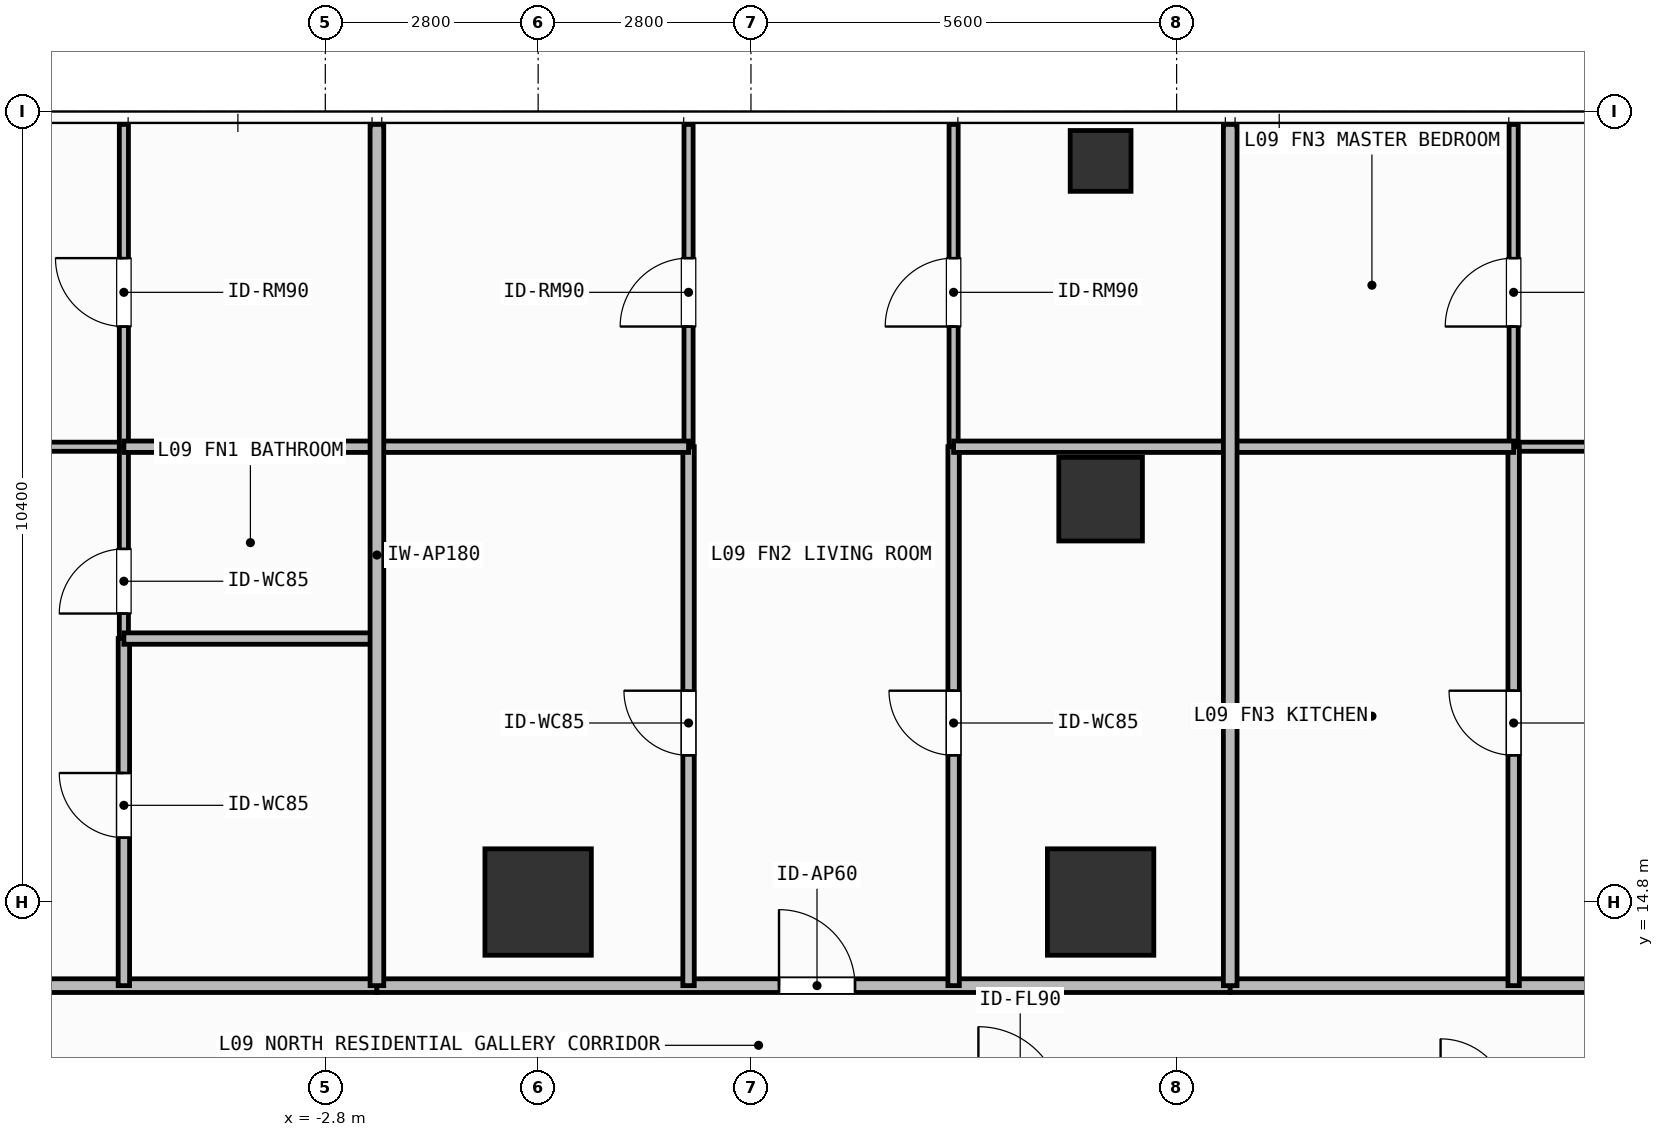
"""IFC4 building model, lengths in metres.
Left out: names, types, materials, properties, quantities, classifications, styles, units other than length and angle.
Written with IfcOpenShell. Run it as: python <this file> out.ifc"""

import sys

from ifc_helpers import new_model, si_unit, direction, frame, frame_2d, origin, origin_2d, place, context, subcontext, project, spatial, rectangle, hollow_rectangle, extrude, element, fill, save


model = new_model("IFC4")
c1 = context("Model", 3, precision=1e-05, world=origin(), true_north=direction((0.0, 1.0)))
c2 = subcontext(c1, "Body", "Model", "MODEL_VIEW")
j1 = project(units=[si_unit("LENGTHUNIT", "METRE"), si_unit("PLANEANGLEUNIT", "RADIAN")], contexts=[c1])
p1 = place(None, origin())
s1 = spatial("IfcSite", under=j1, at=p1, CompositionType="ELEMENT")
p2 = place(p1, origin())
s2 = spatial("IfcBuilding", under=s1, at=p2, CompositionType="ELEMENT")
p3 = place(p2, frame((0.0, 0.0, 34.5)))
s3 = spatial("IfcBuildingStorey", under=s2, at=p3, CompositionType="ELEMENT", Elevation=34.5)
for number, where, z_axis, x_axis in (
    (1, (0.0, 14.8, 0.0), (0.0, 0.0, 1.0), (1.0, 0.0, 0.0)),
    (2, (7.4, 14.8, 0.0), (0.0, 0.0, 1.0), (1.0, 0.0, 0.0)),
):
    element("IfcColumn", number, at=place(p3, frame(where, z_axis=z_axis, x_axis=x_axis)), inside=s3, PredefinedType="COLUMN", context=c2, shape_type="SweptSolid", body=[
        extrude(rectangle(XDim=1.4, YDim=1.4, at=origin_2d()), origin(), (0.0, 0.0, 1.0), 3.9),
    ])
p4 = place(p3, frame((7.4, 20.1, 0.0), z_axis=(0.0, 0.0, 1.0), x_axis=(1.0, 0.0, 0.0)))
e3 = element("IfcColumn", 3, at=p4, inside=s3, PredefinedType="COLUMN", context=c2, shape_type="SweptSolid", body=[
    extrude(rectangle(XDim=1.1, YDim=1.1, at=origin_2d()), origin(), (0.0, 0.0, 1.0), 3.9),
])
p5 = place(p3, frame((7.4, 24.55, 0.0), z_axis=(0.0, 0.0, 1.0), x_axis=(1.0, 0.0, 0.0)))
e4 = element("IfcColumn", 4, at=p5, inside=s3, PredefinedType="COLUMN", context=c2, shape_type="SweptSolid", body=[
    extrude(hollow_rectangle(XDim=0.8, YDim=0.8, WallThickness=0.036, at=origin_2d()), origin(), (0.0, 0.0, 1.0), 3.9),
])
p6 = place(p3, frame((-18.62, 13.7, 0.0), z_axis=(0.0, 0.0, 1.0), x_axis=(1.0, 0.0, 0.0)))
e5 = element("IfcWall", 5, at=p6, inside=s3, PredefinedType="PARTITIONING", context=c2, shape_type="SweptSolid", body=[
    extrude(rectangle(XDim=16.499, YDim=0.18, at=frame_2d((8.25, 0.0))), origin(), (0.0, 0.0, 1.0), 3.68),
])
p7 = place(p6, frame((8.91, 0.0, 0.0)))
e6 = element("IfcOpeningElement", 6, at=p7, cuts=e5, PredefinedType="OPENING", context=c2, shape_type="SweptSolid", body=[
    extrude(rectangle(XDim=1.0, YDim=2.2, at=frame_2d((0.5, 1.1))), frame((0.0, 0.1, 0.0), z_axis=(0.0, -1.0, 0.0), x_axis=(1.0, 0.0, 0.0)), (0.0, 0.0, 1.0), 0.2),
])
p8 = place(p3, frame((-12.818, 20.79, 0.0), z_axis=(0.0, 0.0, 1.0), x_axis=(1.0, 0.0, 0.0)))
e7 = element("IfcWall", 7, at=p8, inside=s3, PredefinedType="PARTITIONING", context=c2, shape_type="SweptSolid", body=[
    extrude(rectangle(XDim=7.368, YDim=0.12, at=frame_2d((3.684, 0.0))), origin(), (0.0, 0.0, 1.0), 3.68),
])
p9 = place(p8, frame((3.322, 0.0, 0.0)))
e8 = element("IfcOpeningElement", 8, at=p9, cuts=e7, PredefinedType="OPENING", context=c2, shape_type="SweptSolid", body=[
    extrude(rectangle(XDim=0.9, YDim=2.1, at=frame_2d((0.45, 1.05))), frame((0.0, 0.07, 0.0), z_axis=(0.0, -1.0, 0.0), x_axis=(1.0, 0.0, 0.0)), (0.0, 0.0, 1.0), 0.14),
])
p10 = place(p3, frame((-5.45, 13.7, 0.0), z_axis=(0.0, 0.0, 1.0), x_axis=(0.0, 1.0, 0.0)))
e9 = element("IfcWall", 9, at=p10, inside=s3, PredefinedType="PARTITIONING", context=c2, shape_type="SweptSolid", body=[
    extrude(rectangle(XDim=4.566, YDim=0.15, at=frame_2d((2.283, 0.0))), origin(), (0.0, 0.0, 1.0), 3.68),
])
p11 = place(p10, frame((1.948, 0.0, 0.0)))
e10 = element("IfcOpeningElement", 10, at=p11, cuts=e9, PredefinedType="OPENING", context=c2, shape_type="SweptSolid", body=[
    extrude(rectangle(XDim=0.85, YDim=2.1, at=frame_2d((0.425, 1.05))), frame((0.0, 0.085, 0.0), z_axis=(0.0, -1.0, 0.0), x_axis=(1.0, 0.0, 0.0)), (0.0, 0.0, 1.0), 0.17),
])
p12 = place(p3, frame((-5.45, 18.266, 0.0), z_axis=(0.0, 0.0, 1.0), x_axis=(0.0, 1.0, 0.0)))
e11 = element("IfcWall", 11, at=p12, inside=s3, PredefinedType="PARTITIONING", context=c2, shape_type="SweptSolid", body=[
    extrude(rectangle(XDim=2.524, YDim=0.12, at=frame_2d((1.262, 0.0))), origin(), (0.0, 0.0, 1.0), 3.68),
])
p13 = place(p12, frame((0.329, 0.0, 0.0)))
e12 = element("IfcOpeningElement", 12, at=p13, cuts=e11, PredefinedType="OPENING", context=c2, shape_type="SweptSolid", body=[
    extrude(rectangle(XDim=0.85, YDim=2.1, at=frame_2d((0.425, 1.05))), frame((0.0, 0.07, 0.0), z_axis=(0.0, -1.0, 0.0), x_axis=(1.0, 0.0, 0.0)), (0.0, 0.0, 1.0), 0.14),
])
p14 = place(p3, frame((-5.45, 20.79, 0.0), z_axis=(0.0, 0.0, 1.0), x_axis=(0.0, 1.0, 0.0)))
e13 = element("IfcWall", 13, at=p14, inside=s3, PredefinedType="PARTITIONING", context=c2, shape_type="SweptSolid", body=[
    extrude(rectangle(XDim=4.24, YDim=0.12, at=frame_2d((2.12, 0.0))), origin(), (0.0, 0.0, 1.0), 3.68),
])
p15 = place(p14, frame((1.581, 0.0, 0.0)))
e14 = element("IfcOpeningElement", 14, at=p15, cuts=e13, PredefinedType="OPENING", context=c2, shape_type="SweptSolid", body=[
    extrude(rectangle(XDim=0.9, YDim=2.1, at=frame_2d((0.45, 1.05))), frame((0.0, 0.07, 0.0), z_axis=(0.0, -1.0, 0.0), x_axis=(1.0, 0.0, 0.0)), (0.0, 0.0, 1.0), 0.14),
])
p16 = place(p3, frame((-2.121, 13.7, 0.0), z_axis=(0.0, 0.0, 1.0), x_axis=(1.0, 0.0, 0.0)))
e15 = element("IfcWall", 15, at=p16, inside=s3, PredefinedType="PARTITIONING", context=c2, shape_type="SweptSolid", body=[
    extrude(rectangle(XDim=11.226, YDim=0.18, at=frame_2d((5.613, 0.0))), origin(), (0.0, 0.0, 1.0), 3.68),
])
p17 = place(p16, frame((5.29, 0.0, 0.0)))
e16 = element("IfcOpeningElement", 16, at=p17, cuts=e15, PredefinedType="OPENING", context=c2, shape_type="SweptSolid", body=[
    extrude(rectangle(XDim=1.0, YDim=2.2, at=frame_2d((0.5, 1.1))), frame((0.0, 0.1, 0.0), z_axis=(0.0, -1.0, 0.0), x_axis=(1.0, 0.0, 0.0)), (0.0, 0.0, 1.0), 0.2),
])
p18 = place(p3, frame((1.979, 13.7, 0.0), z_axis=(0.0, 0.0, 1.0), x_axis=(0.0, 1.0, 0.0)))
e17 = element("IfcWall", 17, at=p18, inside=s3, PredefinedType="PARTITIONING", context=c2, shape_type="SweptSolid", body=[
    extrude(rectangle(XDim=7.09, YDim=0.15, at=frame_2d((3.545, 0.0))), origin(), (0.0, 0.0, 1.0), 3.68),
])
p19 = place(p18, frame((3.03, 0.0, 0.0)))
e18 = element("IfcOpeningElement", 18, at=p19, cuts=e17, PredefinedType="OPENING", context=c2, shape_type="SweptSolid", body=[
    extrude(rectangle(XDim=0.85, YDim=2.1, at=frame_2d((0.425, 1.05))), frame((0.0, 0.085, 0.0), z_axis=(0.0, -1.0, 0.0), x_axis=(1.0, 0.0, 0.0)), (0.0, 0.0, 1.0), 0.17),
])
p20 = place(p3, frame((1.979, 20.79, 0.0), z_axis=(0.0, 0.0, 1.0), x_axis=(0.0, 1.0, 0.0)))
e19 = element("IfcWall", 19, at=p20, inside=s3, PredefinedType="PARTITIONING", context=c2, shape_type="SweptSolid", body=[
    extrude(rectangle(XDim=4.24, YDim=0.12, at=frame_2d((2.12, 0.0))), origin(), (0.0, 0.0, 1.0), 3.68),
])
p21 = place(p20, frame((1.581, 0.0, 0.0)))
e20 = element("IfcOpeningElement", 20, at=p21, cuts=e19, PredefinedType="OPENING", context=c2, shape_type="SweptSolid", body=[
    extrude(rectangle(XDim=0.9, YDim=2.1, at=frame_2d((0.45, 1.05))), frame((0.0, 0.07, 0.0), z_axis=(0.0, -1.0, 0.0), x_axis=(1.0, 0.0, 0.0)), (0.0, 0.0, 1.0), 0.14),
])
p22 = place(p3, frame((5.466, 13.7, 0.0), z_axis=(0.0, 0.0, 1.0), x_axis=(0.0, 1.0, 0.0)))
e21 = element("IfcWall", 21, at=p22, inside=s3, PredefinedType="PARTITIONING", context=c2, shape_type="SweptSolid", body=[
    extrude(rectangle(XDim=7.09, YDim=0.15, at=frame_2d((3.545, 0.0))), origin(), (0.0, 0.0, 1.0), 3.68),
])
p23 = place(p22, frame((3.03, 0.0, 0.0)))
e22 = element("IfcOpeningElement", 22, at=p23, cuts=e21, PredefinedType="OPENING", context=c2, shape_type="SweptSolid", body=[
    extrude(rectangle(XDim=0.85, YDim=2.1, at=frame_2d((0.425, 1.05))), frame((0.0, 0.085, 0.0), z_axis=(0.0, -1.0, 0.0), x_axis=(1.0, 0.0, 0.0)), (0.0, 0.0, 1.0), 0.17),
])
p24 = place(p3, frame((5.466, 20.79, 0.0), z_axis=(0.0, 0.0, 1.0), x_axis=(0.0, 1.0, 0.0)))
e23 = element("IfcWall", 23, at=p24, inside=s3, PredefinedType="PARTITIONING", context=c2, shape_type="SweptSolid", body=[
    extrude(rectangle(XDim=4.24, YDim=0.12, at=frame_2d((2.12, 0.0))), origin(), (0.0, 0.0, 1.0), 3.68),
])
p25 = place(p24, frame((1.581, 0.0, 0.0)))
e24 = element("IfcOpeningElement", 24, at=p25, cuts=e23, PredefinedType="OPENING", context=c2, shape_type="SweptSolid", body=[
    extrude(rectangle(XDim=0.9, YDim=2.1, at=frame_2d((0.45, 1.05))), frame((0.0, 0.07, 0.0), z_axis=(0.0, -1.0, 0.0), x_axis=(1.0, 0.0, 0.0)), (0.0, 0.0, 1.0), 0.14),
])
p26 = place(p3, frame((9.105, 13.7, 0.0), z_axis=(0.0, 0.0, 1.0), x_axis=(1.0, 0.0, 0.0)))
e25 = element("IfcWall", 25, at=p26, inside=s3, PredefinedType="PARTITIONING", context=c2, shape_type="SweptSolid", body=[
    extrude(rectangle(XDim=15.315, YDim=0.18, at=frame_2d((7.657, 0.0))), origin(), (0.0, 0.0, 1.0), 3.68),
])
p27 = place(p26, frame((7.516, 0.0, 0.0)))
e26 = element("IfcOpeningElement", 26, at=p27, cuts=e25, PredefinedType="OPENING", context=c2, shape_type="SweptSolid", body=[
    extrude(rectangle(XDim=1.0, YDim=2.2, at=frame_2d((0.5, 1.1))), frame((0.0, 0.1, 0.0), z_axis=(0.0, -1.0, 0.0), x_axis=(1.0, 0.0, 0.0)), (0.0, 0.0, 1.0), 0.2),
])
p28 = place(p3, frame((12.834, 20.79, 0.0), z_axis=(0.0, 0.0, 1.0), x_axis=(1.0, 0.0, 0.0)))
e27 = element("IfcWall", 27, at=p28, inside=s3, PredefinedType="PARTITIONING", context=c2, shape_type="SweptSolid", body=[
    extrude(rectangle(XDim=8.496, YDim=0.12, at=frame_2d((4.248, 0.0))), origin(), (0.0, 0.0, 1.0), 3.68),
])
p29 = place(p28, frame((3.709, 0.0, 0.0)))
e28 = element("IfcOpeningElement", 28, at=p29, cuts=e27, PredefinedType="OPENING", context=c2, shape_type="SweptSolid", body=[
    extrude(rectangle(XDim=0.9, YDim=2.1, at=frame_2d((0.45, 1.05))), frame((0.0, 0.07, 0.0), z_axis=(0.0, -1.0, 0.0), x_axis=(1.0, 0.0, 0.0)), (0.0, 0.0, 1.0), 0.14),
])
p30 = place(p3, frame((12.834, 13.7, 0.0), z_axis=(0.0, 0.0, 1.0), x_axis=(0.0, 1.0, 0.0)))
e29 = element("IfcWall", 29, at=p30, inside=s3, PredefinedType="PARTITIONING", context=c2, shape_type="SweptSolid", body=[
    extrude(rectangle(XDim=7.09, YDim=0.15, at=frame_2d((3.545, 0.0))), origin(), (0.0, 0.0, 1.0), 3.68),
])
p31 = place(p30, frame((3.03, 0.0, 0.0)))
e30 = element("IfcOpeningElement", 30, at=p31, cuts=e29, PredefinedType="OPENING", context=c2, shape_type="SweptSolid", body=[
    extrude(rectangle(XDim=0.85, YDim=2.1, at=frame_2d((0.425, 1.05))), frame((0.0, 0.085, 0.0), z_axis=(0.0, -1.0, 0.0), x_axis=(1.0, 0.0, 0.0)), (0.0, 0.0, 1.0), 0.17),
])
p32 = place(p3, frame((12.834, 20.79, 0.0), z_axis=(0.0, 0.0, 1.0), x_axis=(0.0, 1.0, 0.0)))
e31 = element("IfcWall", 31, at=p32, inside=s3, PredefinedType="PARTITIONING", context=c2, shape_type="SweptSolid", body=[
    extrude(rectangle(XDim=4.24, YDim=0.12, at=frame_2d((2.12, 0.0))), origin(), (0.0, 0.0, 1.0), 3.68),
])
p33 = place(p32, frame((1.581, 0.0, 0.0)))
e32 = element("IfcOpeningElement", 32, at=p33, cuts=e31, PredefinedType="OPENING", context=c2, shape_type="SweptSolid", body=[
    extrude(rectangle(XDim=0.9, YDim=2.1, at=frame_2d((0.45, 1.05))), frame((0.0, 0.07, 0.0), z_axis=(0.0, -1.0, 0.0), x_axis=(1.0, 0.0, 0.0)), (0.0, 0.0, 1.0), 0.14),
])
for number, where, z_axis, x_axis in (
    (33, (-5.45, 18.266, 0.0), (0.0, 0.0, 1.0), (1.0, 0.0, 0.0)),
    (34, (-5.45, 20.79, 0.0), (0.0, 0.0, 1.0), (1.0, 0.0, 0.0)),
):
    element("IfcWall", number, at=place(p3, frame(where, z_axis=z_axis, x_axis=x_axis)), inside=s3, PredefinedType="PARTITIONING", context=c2, shape_type="SweptSolid", body=[
        extrude(rectangle(XDim=3.329, YDim=0.15, at=frame_2d((1.665, 0.0))), origin(), (0.0, 0.0, 1.0), 3.68),
    ])
p34 = place(p3, frame((-2.121, 20.79, 0.0), z_axis=(0.0, 0.0, 1.0), x_axis=(1.0, 0.0, 0.0)))
e35 = element("IfcWall", 35, at=p34, inside=s3, PredefinedType="PARTITIONING", context=c2, shape_type="SweptSolid", body=[
    extrude(rectangle(XDim=4.1, YDim=0.15, at=frame_2d((2.05, 0.0))), origin(), (0.0, 0.0, 1.0), 3.68),
])
p35 = place(p3, frame((5.466, 20.79, 0.0), z_axis=(0.0, 0.0, 1.0), x_axis=(1.0, 0.0, 0.0)))
e36 = element("IfcWall", 36, at=p35, inside=s3, PredefinedType="PARTITIONING", context=c2, shape_type="SweptSolid", body=[
    extrude(rectangle(XDim=3.639, YDim=0.15, at=frame_2d((1.819, 0.0))), origin(), (0.0, 0.0, 1.0), 3.68),
])
p36 = place(p3, frame((-2.121, 13.7, 0.0), z_axis=(0.0, 0.0, 1.0), x_axis=(0.0, 1.0, 0.0)))
e37 = element("IfcWall", 37, at=p36, inside=s3, PredefinedType="PARTITIONING", context=c2, shape_type="SweptSolid", body=[
    extrude(rectangle(XDim=11.33, YDim=0.18, at=frame_2d((5.665, 0.0))), origin(), (0.0, 0.0, 1.0), 3.68),
])
p37 = place(p3, frame((9.105, 20.79, 0.0), z_axis=(0.0, 0.0, 1.0), x_axis=(1.0, 0.0, 0.0)))
e38 = element("IfcWall", 38, at=p37, inside=s3, PredefinedType="PARTITIONING", context=c2, shape_type="SweptSolid", body=[
    extrude(rectangle(XDim=3.729, YDim=0.15, at=frame_2d((1.865, 0.0))), origin(), (0.0, 0.0, 1.0), 3.68),
])
p38 = place(p3, frame((9.105, 13.7, 0.0), z_axis=(0.0, 0.0, 1.0), x_axis=(0.0, 1.0, 0.0)))
e39 = element("IfcWall", 39, at=p38, inside=s3, PredefinedType="PARTITIONING", context=c2, shape_type="SweptSolid", body=[
    extrude(rectangle(XDim=11.33, YDim=0.18, at=frame_2d((5.665, 0.0))), origin(), (0.0, 0.0, 1.0), 3.68),
])
p39 = place(p11, origin())
e40 = element("IfcDoor", 40, at=p39, inside=s3, OperationType="SINGLE_SWING_RIGHT", PredefinedType="DOOR", context=c2, shape_type="SweptSolid", body=[
    extrude(rectangle(XDim=0.85, YDim=2.1, at=frame_2d((0.425, 1.05))), frame((0.0, 0.025, 0.0), z_axis=(0.0, -1.0, 0.0), x_axis=(1.0, 0.0, 0.0)), (0.0, 0.0, 1.0), 0.05),
])
fill(e10, e40)
p40 = place(p13, origin())
e41 = element("IfcDoor", 41, at=p40, inside=s3, OperationType="SINGLE_SWING_LEFT", PredefinedType="DOOR", context=c2, shape_type="SweptSolid", body=[
    extrude(rectangle(XDim=0.85, YDim=2.1, at=frame_2d((0.425, 1.05))), frame((0.0, 0.025, 0.0), z_axis=(0.0, -1.0, 0.0), x_axis=(1.0, 0.0, 0.0)), (0.0, 0.0, 1.0), 0.05),
])
fill(e12, e41)
p41 = place(p15, origin())
e42 = element("IfcDoor", 42, at=p41, inside=s3, OperationType="SINGLE_SWING_RIGHT", PredefinedType="DOOR", context=c2, shape_type="SweptSolid", body=[
    extrude(rectangle(XDim=0.9, YDim=2.1, at=frame_2d((0.45, 1.05))), frame((0.0, 0.025, 0.0), z_axis=(0.0, -1.0, 0.0), x_axis=(1.0, 0.0, 0.0)), (0.0, 0.0, 1.0), 0.05),
])
fill(e14, e42)
p42 = place(p17, origin())
e43 = element("IfcDoor", 43, at=p42, inside=s3, OperationType="SINGLE_SWING_LEFT", PredefinedType="DOOR", context=c2, shape_type="SweptSolid", body=[
    extrude(rectangle(XDim=1.0, YDim=2.2, at=frame_2d((0.5, 1.1))), frame((0.0, 0.025, 0.0), z_axis=(0.0, -1.0, 0.0), x_axis=(1.0, 0.0, 0.0)), (0.0, 0.0, 1.0), 0.05),
])
fill(e16, e43)
p43 = place(p19, origin())
e44 = element("IfcDoor", 44, at=p43, inside=s3, OperationType="SINGLE_SWING_RIGHT", PredefinedType="DOOR", context=c2, shape_type="SweptSolid", body=[
    extrude(rectangle(XDim=0.85, YDim=2.1, at=frame_2d((0.425, 1.05))), frame((0.0, 0.025, 0.0), z_axis=(0.0, -1.0, 0.0), x_axis=(1.0, 0.0, 0.0)), (0.0, 0.0, 1.0), 0.05),
])
fill(e18, e44)
p44 = place(p21, origin())
e45 = element("IfcDoor", 45, at=p44, inside=s3, OperationType="SINGLE_SWING_LEFT", PredefinedType="DOOR", context=c2, shape_type="SweptSolid", body=[
    extrude(rectangle(XDim=0.9, YDim=2.1, at=frame_2d((0.45, 1.05))), frame((0.0, 0.025, 0.0), z_axis=(0.0, -1.0, 0.0), x_axis=(1.0, 0.0, 0.0)), (0.0, 0.0, 1.0), 0.05),
])
fill(e20, e45)
p45 = place(p23, origin())
e46 = element("IfcDoor", 46, at=p45, inside=s3, OperationType="SINGLE_SWING_RIGHT", PredefinedType="DOOR", context=c2, shape_type="SweptSolid", body=[
    extrude(rectangle(XDim=0.85, YDim=2.1, at=frame_2d((0.425, 1.05))), frame((0.0, 0.025, 0.0), z_axis=(0.0, -1.0, 0.0), x_axis=(1.0, 0.0, 0.0)), (0.0, 0.0, 1.0), 0.05),
])
fill(e22, e46)
p46 = place(p25, origin())
e47 = element("IfcDoor", 47, at=p46, inside=s3, OperationType="SINGLE_SWING_LEFT", PredefinedType="DOOR", context=c2, shape_type="SweptSolid", body=[
    extrude(rectangle(XDim=0.9, YDim=2.1, at=frame_2d((0.45, 1.05))), frame((0.0, 0.025, 0.0), z_axis=(0.0, -1.0, 0.0), x_axis=(1.0, 0.0, 0.0)), (0.0, 0.0, 1.0), 0.05),
])
fill(e24, e47)
p47 = place(p31, origin())
e48 = element("IfcDoor", 48, at=p47, inside=s3, OperationType="SINGLE_SWING_RIGHT", PredefinedType="DOOR", context=c2, shape_type="SweptSolid", body=[
    extrude(rectangle(XDim=0.85, YDim=2.1, at=frame_2d((0.425, 1.05))), frame((0.0, 0.025, 0.0), z_axis=(0.0, -1.0, 0.0), x_axis=(1.0, 0.0, 0.0)), (0.0, 0.0, 1.0), 0.05),
])
fill(e30, e48)
p48 = place(p33, origin())
e49 = element("IfcDoor", 49, at=p48, inside=s3, OperationType="SINGLE_SWING_LEFT", PredefinedType="DOOR", context=c2, shape_type="SweptSolid", body=[
    extrude(rectangle(XDim=0.9, YDim=2.1, at=frame_2d((0.45, 1.05))), frame((0.0, 0.025, 0.0), z_axis=(0.0, -1.0, 0.0), x_axis=(1.0, 0.0, 0.0)), (0.0, 0.0, 1.0), 0.05),
])
fill(e32, e49)
save(model, sys.argv[1])
